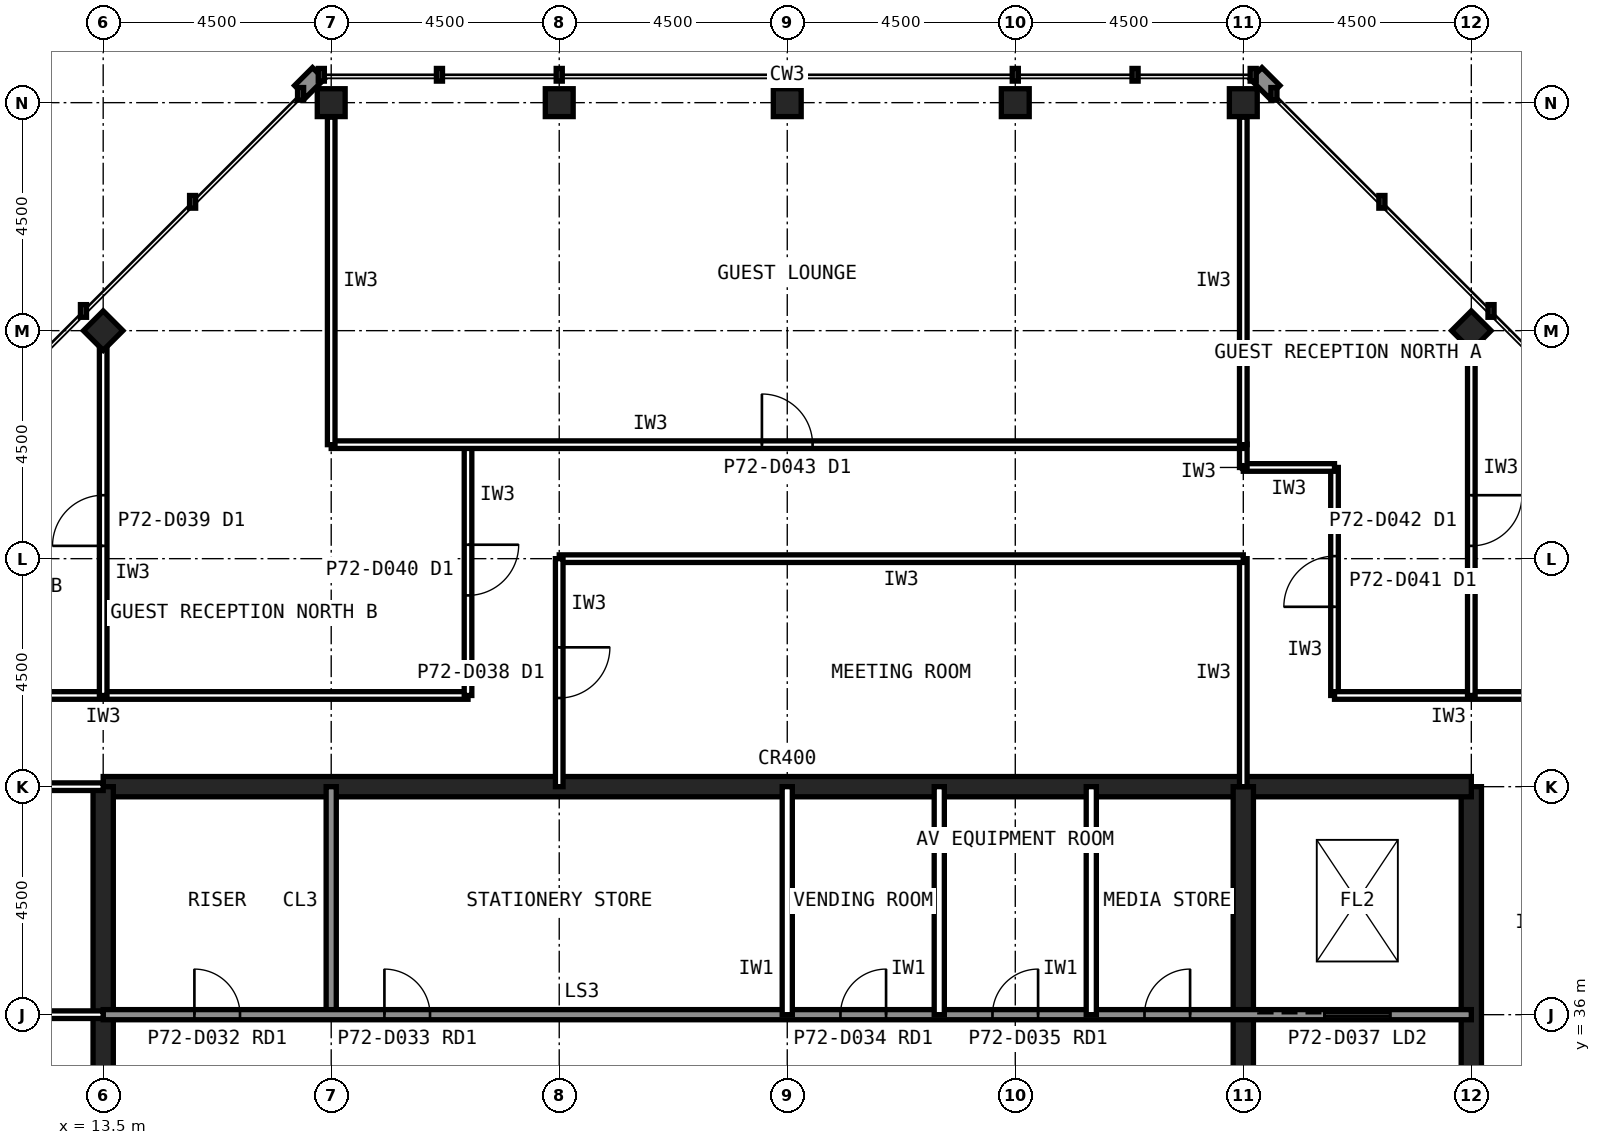
"""IFC4 building model, lengths in metres.
Left out: names, types, materials, properties, quantities, classifications, styles, units other than length and angle.
Written with IfcOpenShell. Run it as: python <this file> out.ifc"""

import sys

from ifc_helpers import new_model, si_unit, direction, frame, frame_2d, origin, origin_2d, place, context, subcontext, project, spatial, rectangle, hollow_rectangle, extrude, element, fill, save


model = new_model("IFC4")
c1 = context("Model", 3, precision=1e-05, world=origin(), true_north=direction((0.0, 1.0)))
c2 = subcontext(c1, "Body", "Model", "MODEL_VIEW")
j1 = project(units=[si_unit("LENGTHUNIT", "METRE"), si_unit("PLANEANGLEUNIT", "RADIAN")], contexts=[c1])
p1 = place(None, origin())
s1 = spatial("IfcSite", under=j1, at=p1, CompositionType="ELEMENT")
p2 = place(p1, origin())
s2 = spatial("IfcBuilding", under=s1, at=p2, CompositionType="ELEMENT")
p3 = place(p2, frame((0.0, 0.0, 302.6)))
s3 = spatial("IfcBuildingStorey", under=s2, at=p3, CompositionType="ELEMENT", Elevation=302.6)
for number, where, z_axis, x_axis in (
    (1, (36.0, 54.0, 0.0), (0.0, 0.0, 1.0), (1.0, 0.0, 0.0)),
    (2, (31.5, 54.0, 0.0), (0.0, 0.0, 1.0), (1.0, 0.0, 0.0)),
    (3, (27.0, 54.0, 0.0), (0.0, 0.0, 1.0), (1.0, 0.0, 0.0)),
    (4, (22.5, 54.0, 0.0), (0.0, 0.0, 1.0), (1.0, 0.0, 0.0)),
    (5, (18.0, 54.0, 0.0), (0.0, 0.0, 1.0), (1.0, 0.0, 0.0)),
    (6, (40.5, 49.5, 0.0), (0.0, 0.0, 1.0), (0.707, 0.707, 0.0)),
    (7, (13.5, 49.5, 0.0), (0.0, 0.0, 1.0), (0.707, 0.707, 0.0)),
):
    element("IfcColumn", number, at=place(p3, frame(where, z_axis=z_axis, x_axis=x_axis)), inside=s3, PredefinedType="COLUMN", context=c2, shape_type="SweptSolid", body=[
        extrude(hollow_rectangle(XDim=0.55, YDim=0.55, WallThickness=0.025, at=origin_2d()), origin(), (0.0, 0.0, 1.0), 4.0),
    ])
p4 = place(p3, frame((40.5, 13.5, 0.0), z_axis=(0.0, 0.0, 1.0), x_axis=(0.0, 1.0, 0.0)))
e8 = element("IfcWall", 8, at=p4, inside=s3, PredefinedType="SHEAR", context=c2, shape_type="SweptSolid", body=[
    extrude(rectangle(XDim=27.0, YDim=0.4, at=frame_2d((13.5, 0.0))), origin(), (0.0, 0.0, 1.0), 4.0),
])
p5 = place(p4, frame((5.85, 0.0, 0.0)))
e9 = element("IfcOpeningElement", 9, at=p5, cuts=e8, PredefinedType="OPENING", context=c2, shape_type="SweptSolid", body=[
    extrude(rectangle(XDim=1.8, YDim=2.1, at=frame_2d((0.9, 1.05))), frame((0.0, 0.21, 0.0), z_axis=(0.0, -1.0, 0.0), x_axis=(1.0, 0.0, 0.0)), (0.0, 0.0, 1.0), 0.42),
])
p6 = place(p4, frame((19.65, 0.0, 0.0)))
e10 = element("IfcOpeningElement", 10, at=p6, cuts=e8, PredefinedType="OPENING", context=c2, shape_type="SweptSolid", body=[
    extrude(rectangle(XDim=1.2, YDim=2.1, at=frame_2d((0.6, 1.05))), frame((0.0, 0.21, 0.0), z_axis=(0.0, -1.0, 0.0), x_axis=(1.0, 0.0, 0.0)), (0.0, 0.0, 1.0), 0.42),
])
p7 = place(p3, frame((40.5, 40.5, 0.0), z_axis=(0.0, 0.0, 1.0), x_axis=(-1.0, 0.0, 0.0)))
e11 = element("IfcWall", 11, at=p7, inside=s3, PredefinedType="SHEAR", context=c2, shape_type="SweptSolid", body=[
    extrude(rectangle(XDim=27.0, YDim=0.4, at=frame_2d((13.5, 0.0))), origin(), (0.0, 0.0, 1.0), 4.0),
])
p8 = place(p3, frame((13.5, 40.5, 0.0), z_axis=(0.0, 0.0, 1.0), x_axis=(0.0, -1.0, 0.0)))
e12 = element("IfcWall", 12, at=p8, inside=s3, PredefinedType="SHEAR", context=c2, shape_type="SweptSolid", body=[
    extrude(rectangle(XDim=27.0, YDim=0.4, at=frame_2d((13.5, 0.0))), origin(), (0.0, 0.0, 1.0), 4.0),
])
p9 = place(p8, frame((19.65, 0.0, 0.0)))
e13 = element("IfcOpeningElement", 13, at=p9, cuts=e12, PredefinedType="OPENING", context=c2, shape_type="SweptSolid", body=[
    extrude(rectangle(XDim=1.2, YDim=2.1, at=frame_2d((0.6, 1.05))), frame((0.0, 0.21, 0.0), z_axis=(0.0, -1.0, 0.0), x_axis=(1.0, 0.0, 0.0)), (0.0, 0.0, 1.0), 0.42),
])
p10 = place(p8, frame((5.85, 0.0, 0.0)))
e14 = element("IfcOpeningElement", 14, at=p10, cuts=e12, PredefinedType="OPENING", context=c2, shape_type="SweptSolid", body=[
    extrude(rectangle(XDim=1.8, YDim=2.1, at=frame_2d((0.9, 1.05))), frame((0.0, 0.21, 0.0), z_axis=(0.0, -1.0, 0.0), x_axis=(1.0, 0.0, 0.0)), (0.0, 0.0, 1.0), 0.42),
])
p11 = place(p3, frame((18.0, 36.0, 0.0), z_axis=(0.0, 0.0, 1.0), x_axis=(0.0, 1.0, 0.0)))
e15 = element("IfcWall", 15, at=p11, inside=s3, PredefinedType="SOLIDWALL", context=c2, shape_type="SweptSolid", body=[
    extrude(rectangle(XDim=4.5, YDim=0.2, at=frame_2d((2.25, 0.0))), origin(), (0.0, 0.0, 1.0), 3.84),
])
p12 = place(p3, frame((36.0, 22.5, 0.0), z_axis=(0.0, 0.0, 1.0), x_axis=(0.0, 1.0, 0.0)))
e16 = element("IfcWall", 16, at=p12, inside=s3, PredefinedType="SHEAR", context=c2, shape_type="SweptSolid", body=[
    extrude(rectangle(XDim=18.0, YDim=0.4, at=frame_2d((9.0, 0.0))), origin(), (0.0, 0.0, 1.0), 4.0),
])
p13 = place(p3, frame((13.5, 36.0, 0.0), z_axis=(0.0, 0.0, 1.0), x_axis=(1.0, 0.0, 0.0)))
e17 = element("IfcWall", 17, at=p13, inside=s3, PredefinedType="SOLIDWALL", context=c2, shape_type="SweptSolid", body=[
    extrude(rectangle(XDim=27.0, YDim=0.2, at=frame_2d((13.5, 0.0))), origin(), (0.0, 0.0, 1.0), 3.84),
])
p14 = place(p13, frame((1.8, 0.0, 0.0)))
e18 = element("IfcOpeningElement", 18, at=p14, cuts=e17, PredefinedType="OPENING", context=c2, shape_type="SweptSolid", body=[
    extrude(rectangle(XDim=0.9, YDim=2.1, at=frame_2d((0.45, 1.05))), frame((0.0, 0.11, 0.0), z_axis=(0.0, -1.0, 0.0), x_axis=(1.0, 0.0, 0.0)), (0.0, 0.0, 1.0), 0.22),
])
p15 = place(p13, frame((5.55, 0.0, 0.0)))
e19 = element("IfcOpeningElement", 19, at=p15, cuts=e17, PredefinedType="OPENING", context=c2, shape_type="SweptSolid", body=[
    extrude(rectangle(XDim=0.9, YDim=2.1, at=frame_2d((0.45, 1.05))), frame((0.0, 0.11, 0.0), z_axis=(0.0, -1.0, 0.0), x_axis=(1.0, 0.0, 0.0)), (0.0, 0.0, 1.0), 0.22),
])
p16 = place(p13, frame((14.55, 0.0, 0.0)))
e20 = element("IfcOpeningElement", 20, at=p16, cuts=e17, PredefinedType="OPENING", context=c2, shape_type="SweptSolid", body=[
    extrude(rectangle(XDim=0.9, YDim=2.1, at=frame_2d((0.45, 1.05))), frame((0.0, 0.11, 0.0), z_axis=(0.0, -1.0, 0.0), x_axis=(1.0, 0.0, 0.0)), (0.0, 0.0, 1.0), 0.22),
])
p17 = place(p13, frame((17.55, 0.0, 0.0)))
e21 = element("IfcOpeningElement", 21, at=p17, cuts=e17, PredefinedType="OPENING", context=c2, shape_type="SweptSolid", body=[
    extrude(rectangle(XDim=0.9, YDim=2.1, at=frame_2d((0.45, 1.05))), frame((0.0, 0.11, 0.0), z_axis=(0.0, -1.0, 0.0), x_axis=(1.0, 0.0, 0.0)), (0.0, 0.0, 1.0), 0.22),
])
p18 = place(p13, frame((20.55, 0.0, 0.0)))
e22 = element("IfcOpeningElement", 22, at=p18, cuts=e17, PredefinedType="OPENING", context=c2, shape_type="SweptSolid", body=[
    extrude(rectangle(XDim=0.9, YDim=2.1, at=frame_2d((0.45, 1.05))), frame((0.0, 0.11, 0.0), z_axis=(0.0, -1.0, 0.0), x_axis=(1.0, 0.0, 0.0)), (0.0, 0.0, 1.0), 0.22),
])
p19 = place(p13, frame((24.1, 0.0, 0.0)))
e23 = element("IfcOpeningElement", 23, at=p19, cuts=e17, PredefinedType="OPENING", context=c2, shape_type="SweptSolid", body=[
    extrude(rectangle(XDim=1.3, YDim=2.2, at=frame_2d((0.65, 1.1))), frame((0.0, 0.11, 0.0), z_axis=(0.0, -1.0, 0.0), x_axis=(1.0, 0.0, 0.0)), (0.0, 0.0, 1.0), 0.22),
])
for number, where, z_axis, x_axis in (
    (24, (27.0, 36.0, 0.0), (0.0, 0.0, 1.0), (0.0, 1.0, 0.0)),
    (25, (30.0, 36.0, 0.0), (0.0, 0.0, 1.0), (0.0, 1.0, 0.0)),
    (26, (33.0, 36.0, 0.0), (0.0, 0.0, 1.0), (0.0, 1.0, 0.0)),
):
    element("IfcWall", number, at=place(p3, frame(where, z_axis=z_axis, x_axis=x_axis)), inside=s3, PredefinedType="PARTITIONING", context=c2, shape_type="SweptSolid", body=[
        extrude(rectangle(XDim=4.5, YDim=0.2, at=frame_2d((2.25, 0.0))), origin(), (0.0, 0.0, 1.0), 3.84),
    ])
p20 = place(p3, frame((37.8, 42.3, 0.0), z_axis=(0.0, 0.0, 1.0), x_axis=(0.0, 1.0, 0.0)))
e27 = element("IfcWall", 27, at=p20, inside=s3, PredefinedType="PARTITIONING", context=c2, shape_type="SweptSolid", body=[
    extrude(rectangle(XDim=4.5, YDim=0.15, at=frame_2d((2.25, 0.0))), origin(), (0.0, 0.0, 1.0), 3.84),
])
p21 = place(p20, frame((1.75, 0.0, 0.0)))
e28 = element("IfcOpeningElement", 28, at=p21, cuts=e27, PredefinedType="OPENING", context=c2, shape_type="SweptSolid", body=[
    extrude(rectangle(XDim=1.0, YDim=2.1, at=frame_2d((0.5, 1.05))), frame((0.0, 0.085, 0.0), z_axis=(0.0, -1.0, 0.0), x_axis=(1.0, 0.0, 0.0)), (0.0, 0.0, 1.0), 0.17),
])
p22 = place(p3, frame((42.3, 42.3, 0.0), z_axis=(0.0, 0.0, 1.0), x_axis=(-1.0, 0.0, 0.0)))
e29 = element("IfcWall", 29, at=p22, inside=s3, PredefinedType="PARTITIONING", context=c2, shape_type="SweptSolid", body=[
    extrude(rectangle(XDim=4.5, YDim=0.15, at=frame_2d((2.25, 0.0))), origin(), (0.0, 0.0, 1.0), 3.84),
])
p23 = place(p3, frame((37.8, 46.8, 0.0), z_axis=(0.0, 0.0, 1.0), x_axis=(-1.0, 0.0, 0.0)))
e30 = element("IfcWall", 30, at=p23, inside=s3, PredefinedType="PARTITIONING", context=c2, shape_type="SweptSolid", body=[
    extrude(rectangle(XDim=1.8, YDim=0.15, at=frame_2d((0.9, 0.0))), origin(), (0.0, 0.0, 1.0), 3.84),
])
p24 = place(p3, frame((36.0, 46.8, 0.0), z_axis=(0.0, 0.0, 1.0), x_axis=(0.0, 1.0, 0.0)))
e31 = element("IfcWall", 31, at=p24, inside=s3, PredefinedType="PARTITIONING", context=c2, shape_type="SweptSolid", body=[
    extrude(rectangle(XDim=0.46, YDim=0.15, at=frame_2d((0.23, 0.0))), origin(), (0.0, 0.0, 1.0), 2.989),
])
p25 = place(p3, frame((20.7, 42.3, 0.0), z_axis=(0.0, 0.0, 1.0), x_axis=(-1.0, 0.0, 0.0)))
e32 = element("IfcWall", 32, at=p25, inside=s3, PredefinedType="PARTITIONING", context=c2, shape_type="SweptSolid", body=[
    extrude(rectangle(XDim=14.4, YDim=0.15, at=frame_2d((7.2, 0.0))), origin(), (0.0, 0.0, 1.0), 3.84),
])
p26 = place(p3, frame((20.7, 47.25, 0.0), z_axis=(0.0, 0.0, 1.0), x_axis=(0.0, -1.0, 0.0)))
e33 = element("IfcWall", 33, at=p26, inside=s3, PredefinedType="PARTITIONING", context=c2, shape_type="SweptSolid", body=[
    extrude(rectangle(XDim=4.95, YDim=0.15, at=frame_2d((2.475, 0.0))), origin(), (0.0, 0.0, 1.0), 3.84),
])
p27 = place(p26, frame((1.975, 0.0, 0.0)))
e34 = element("IfcOpeningElement", 34, at=p27, cuts=e33, PredefinedType="OPENING", context=c2, shape_type="SweptSolid", body=[
    extrude(rectangle(XDim=1.0, YDim=2.1, at=frame_2d((0.5, 1.05))), frame((0.0, 0.085, 0.0), z_axis=(0.0, -1.0, 0.0), x_axis=(1.0, 0.0, 0.0)), (0.0, 0.0, 1.0), 0.17),
])
p28 = place(p3, frame((18.0, 47.25, 0.0), z_axis=(0.0, 0.0, 1.0), x_axis=(1.0, 0.0, 0.0)))
e35 = element("IfcWall", 35, at=p28, inside=s3, PredefinedType="PARTITIONING", context=c2, shape_type="SweptSolid", body=[
    extrude(rectangle(XDim=18.0, YDim=0.15, at=frame_2d((9.0, 0.0))), origin(), (0.0, 0.0, 1.0), 3.84),
])
p29 = place(p28, frame((8.5, 0.0, 0.0)))
e36 = element("IfcOpeningElement", 36, at=p29, cuts=e35, PredefinedType="OPENING", context=c2, shape_type="SweptSolid", body=[
    extrude(rectangle(XDim=1.0, YDim=2.1, at=frame_2d((0.5, 1.05))), frame((0.0, 0.085, 0.0), z_axis=(0.0, -1.0, 0.0), x_axis=(1.0, 0.0, 0.0)), (0.0, 0.0, 1.0), 0.17),
])
for number, where, z_axis, x_axis in (
    (37, (36.0, 47.25, 0.0), (0.0, 0.0, 1.0), (0.0, 1.0, 0.0)),
    (38, (18.0, 53.715, 0.0), (0.0, 0.0, 1.0), (0.0, -1.0, 0.0)),
):
    element("IfcWall", number, at=place(p3, frame(where, z_axis=z_axis, x_axis=x_axis)), inside=s3, PredefinedType="PARTITIONING", context=c2, shape_type="SweptSolid", body=[
        extrude(rectangle(XDim=6.465, YDim=0.15, at=frame_2d((3.232, 0.0))), origin(), (0.0, 0.0, 1.0), 2.989),
    ])
p30 = place(p3, frame((36.0, 40.5, 0.0), z_axis=(0.0, 0.0, 1.0), x_axis=(0.0, 1.0, 0.0)))
e39 = element("IfcWall", 39, at=p30, inside=s3, PredefinedType="PARTITIONING", context=c2, shape_type="SweptSolid", body=[
    extrude(rectangle(XDim=4.5, YDim=0.15, at=frame_2d((2.25, 0.0))), origin(), (0.0, 0.0, 1.0), 2.989),
])
p31 = place(p3, frame((36.0, 45.0, 0.0), z_axis=(0.0, 0.0, 1.0), x_axis=(-1.0, 0.0, 0.0)))
e40 = element("IfcWall", 40, at=p31, inside=s3, PredefinedType="PARTITIONING", context=c2, shape_type="SweptSolid", body=[
    extrude(rectangle(XDim=13.5, YDim=0.15, at=frame_2d((6.75, 0.0))), origin(), (0.0, 0.0, 1.0), 3.84),
])
p32 = place(p3, frame((22.5, 45.0, 0.0), z_axis=(0.0, 0.0, 1.0), x_axis=(0.0, -1.0, 0.0)))
e41 = element("IfcWall", 41, at=p32, inside=s3, PredefinedType="PARTITIONING", context=c2, shape_type="SweptSolid", body=[
    extrude(rectangle(XDim=4.5, YDim=0.15, at=frame_2d((2.25, 0.0))), origin(), (0.0, 0.0, 1.0), 2.989),
])
p33 = place(p32, frame((1.75, 0.0, 0.0)))
e42 = element("IfcOpeningElement", 42, at=p33, cuts=e41, PredefinedType="OPENING", context=c2, shape_type="SweptSolid", body=[
    extrude(rectangle(XDim=1.0, YDim=2.1, at=frame_2d((0.5, 1.05))), frame((0.0, 0.085, 0.0), z_axis=(0.0, -1.0, 0.0), x_axis=(1.0, 0.0, 0.0)), (0.0, 0.0, 1.0), 0.17),
])
p34 = place(p3, frame((8.1, 36.0, 0.0), z_axis=(0.0, 0.0, 1.0), x_axis=(1.0, 0.0, 0.0)))
e43 = element("IfcWall", 43, at=p34, inside=s3, PredefinedType="PARTITIONING", context=c2, shape_type="SweptSolid", body=[
    extrude(rectangle(XDim=5.4, YDim=0.15, at=frame_2d((2.7, 0.0))), origin(), (0.0, 0.0, 1.0), 2.989),
])
p35 = place(p34, frame((2.2, 0.0, 0.0)))
e44 = element("IfcOpeningElement", 44, at=p35, cuts=e43, PredefinedType="OPENING", context=c2, shape_type="SweptSolid", body=[
    extrude(rectangle(XDim=1.0, YDim=2.1, at=frame_2d((0.5, 1.05))), frame((0.0, 0.085, 0.0), z_axis=(0.0, -1.0, 0.0), x_axis=(1.0, 0.0, 0.0)), (0.0, 0.0, 1.0), 0.17),
])
p36 = place(p3, frame((13.5, 40.5, 0.0), z_axis=(0.0, 0.0, 1.0), x_axis=(-1.0, 0.0, 0.0)))
e45 = element("IfcWall", 45, at=p36, inside=s3, PredefinedType="PARTITIONING", context=c2, shape_type="SweptSolid", body=[
    extrude(rectangle(XDim=5.4, YDim=0.15, at=frame_2d((2.7, 0.0))), origin(), (0.0, 0.0, 1.0), 2.989),
])
p37 = place(p3, frame((40.5, 49.205, 0.0), z_axis=(0.0, 0.0, 1.0), x_axis=(0.0, -1.0, 0.0)))
e46 = element("IfcWall", 46, at=p37, inside=s3, PredefinedType="PARTITIONING", context=c2, shape_type="SweptSolid", body=[
    extrude(rectangle(XDim=6.905, YDim=0.15, at=frame_2d((3.453, 0.0))), origin(), (0.0, 0.0, 1.0), 2.989),
])
p38 = place(p37, frame((2.952, 0.0, 0.0)))
e47 = element("IfcOpeningElement", 47, at=p38, cuts=e46, PredefinedType="OPENING", context=c2, shape_type="SweptSolid", body=[
    extrude(rectangle(XDim=1.0, YDim=2.1, at=frame_2d((0.5, 1.05))), frame((0.0, 0.085, 0.0), z_axis=(0.0, -1.0, 0.0), x_axis=(1.0, 0.0, 0.0)), (0.0, 0.0, 1.0), 0.17),
])
p39 = place(p3, frame((13.5, 42.3, 0.0), z_axis=(0.0, 0.0, 1.0), x_axis=(0.0, 1.0, 0.0)))
e48 = element("IfcWall", 48, at=p39, inside=s3, PredefinedType="PARTITIONING", context=c2, shape_type="SweptSolid", body=[
    extrude(rectangle(XDim=6.905, YDim=0.15, at=frame_2d((3.453, 0.0))), origin(), (0.0, 0.0, 1.0), 2.989),
])
p40 = place(p39, frame((2.952, 0.0, 0.0)))
e49 = element("IfcOpeningElement", 49, at=p40, cuts=e48, PredefinedType="OPENING", context=c2, shape_type="SweptSolid", body=[
    extrude(rectangle(XDim=1.0, YDim=2.1, at=frame_2d((0.5, 1.05))), frame((0.0, 0.085, 0.0), z_axis=(0.0, -1.0, 0.0), x_axis=(1.0, 0.0, 0.0)), (0.0, 0.0, 1.0), 0.17),
])
p41 = place(p14, origin())
e50 = element("IfcDoor", 50, at=p41, inside=s3, OperationType="SINGLE_SWING_LEFT", PredefinedType="DOOR", context=c2, shape_type="SweptSolid", body=[
    extrude(rectangle(XDim=0.9, YDim=2.1, at=frame_2d((0.45, 1.05))), frame((0.0, 0.025, 0.0), z_axis=(0.0, -1.0, 0.0), x_axis=(1.0, 0.0, 0.0)), (0.0, 0.0, 1.0), 0.05),
])
fill(e18, e50)
p42 = place(p15, origin())
e51 = element("IfcDoor", 51, at=p42, inside=s3, OperationType="SINGLE_SWING_LEFT", PredefinedType="DOOR", context=c2, shape_type="SweptSolid", body=[
    extrude(rectangle(XDim=0.9, YDim=2.1, at=frame_2d((0.45, 1.05))), frame((0.0, 0.025, 0.0), z_axis=(0.0, -1.0, 0.0), x_axis=(1.0, 0.0, 0.0)), (0.0, 0.0, 1.0), 0.05),
])
fill(e19, e51)
p43 = place(p16, origin())
e52 = element("IfcDoor", 52, at=p43, inside=s3, OperationType="SINGLE_SWING_RIGHT", PredefinedType="DOOR", context=c2, shape_type="SweptSolid", body=[
    extrude(rectangle(XDim=0.9, YDim=2.1, at=frame_2d((0.45, 1.05))), frame((0.0, 0.025, 0.0), z_axis=(0.0, -1.0, 0.0), x_axis=(1.0, 0.0, 0.0)), (0.0, 0.0, 1.0), 0.05),
])
fill(e20, e52)
p44 = place(p17, origin())
e53 = element("IfcDoor", 53, at=p44, inside=s3, OperationType="SINGLE_SWING_RIGHT", PredefinedType="DOOR", context=c2, shape_type="SweptSolid", body=[
    extrude(rectangle(XDim=0.9, YDim=2.1, at=frame_2d((0.45, 1.05))), frame((0.0, 0.025, 0.0), z_axis=(0.0, -1.0, 0.0), x_axis=(1.0, 0.0, 0.0)), (0.0, 0.0, 1.0), 0.05),
])
fill(e21, e53)
p45 = place(p18, origin())
e54 = element("IfcDoor", 54, at=p45, inside=s3, OperationType="SINGLE_SWING_RIGHT", PredefinedType="DOOR", context=c2, shape_type="SweptSolid", body=[
    extrude(rectangle(XDim=0.9, YDim=2.1, at=frame_2d((0.45, 1.05))), frame((0.0, 0.025, 0.0), z_axis=(0.0, -1.0, 0.0), x_axis=(1.0, 0.0, 0.0)), (0.0, 0.0, 1.0), 0.05),
])
fill(e22, e54)
p46 = place(p19, origin())
e55 = element("IfcDoor", 55, at=p46, inside=s3, OperationType="SLIDING_TO_LEFT", PredefinedType="DOOR", context=c2, shape_type="SweptSolid", body=[
    extrude(rectangle(XDim=1.3, YDim=2.2, at=frame_2d((0.65, 1.1))), frame((0.0, 0.025, 0.0), z_axis=(0.0, -1.0, 0.0), x_axis=(1.0, 0.0, 0.0)), (0.0, 0.0, 1.0), 0.05),
])
fill(e23, e55)
p47 = place(p21, origin())
e56 = element("IfcDoor", 56, at=p47, inside=s3, OperationType="SINGLE_SWING_LEFT", PredefinedType="DOOR", context=c2, shape_type="SweptSolid", body=[
    extrude(rectangle(XDim=1.0, YDim=2.1, at=frame_2d((0.5, 1.05))), frame((0.0, 0.025, 0.0), z_axis=(0.0, -1.0, 0.0), x_axis=(1.0, 0.0, 0.0)), (0.0, 0.0, 1.0), 0.05),
])
fill(e28, e56)
p48 = place(p27, origin())
e57 = element("IfcDoor", 57, at=p48, inside=s3, OperationType="SINGLE_SWING_LEFT", PredefinedType="DOOR", context=c2, shape_type="SweptSolid", body=[
    extrude(rectangle(XDim=1.0, YDim=2.1, at=frame_2d((0.5, 1.05))), frame((0.0, 0.025, 0.0), z_axis=(0.0, -1.0, 0.0), x_axis=(1.0, 0.0, 0.0)), (0.0, 0.0, 1.0), 0.05),
])
fill(e34, e57)
p49 = place(p29, origin())
e58 = element("IfcDoor", 58, at=p49, inside=s3, OperationType="SINGLE_SWING_LEFT", PredefinedType="DOOR", context=c2, shape_type="SweptSolid", body=[
    extrude(rectangle(XDim=1.0, YDim=2.1, at=frame_2d((0.5, 1.05))), frame((0.0, 0.025, 0.0), z_axis=(0.0, -1.0, 0.0), x_axis=(1.0, 0.0, 0.0)), (0.0, 0.0, 1.0), 0.05),
])
fill(e36, e58)
p50 = place(p33, origin())
e59 = element("IfcDoor", 59, at=p50, inside=s3, OperationType="SINGLE_SWING_LEFT", PredefinedType="DOOR", context=c2, shape_type="SweptSolid", body=[
    extrude(rectangle(XDim=1.0, YDim=2.1, at=frame_2d((0.5, 1.05))), frame((0.0, 0.025, 0.0), z_axis=(0.0, -1.0, 0.0), x_axis=(1.0, 0.0, 0.0)), (0.0, 0.0, 1.0), 0.05),
])
fill(e42, e59)
p51 = place(p38, origin())
e60 = element("IfcDoor", 60, at=p51, inside=s3, OperationType="SINGLE_SWING_LEFT", PredefinedType="DOOR", context=c2, shape_type="SweptSolid", body=[
    extrude(rectangle(XDim=1.0, YDim=2.1, at=frame_2d((0.5, 1.05))), frame((0.0, 0.025, 0.0), z_axis=(0.0, -1.0, 0.0), x_axis=(1.0, 0.0, 0.0)), (0.0, 0.0, 1.0), 0.05),
])
fill(e47, e60)
p52 = place(p40, origin())
e61 = element("IfcDoor", 61, at=p52, inside=s3, OperationType="SINGLE_SWING_LEFT", PredefinedType="DOOR", context=c2, shape_type="SweptSolid", body=[
    extrude(rectangle(XDim=1.0, YDim=2.1, at=frame_2d((0.5, 1.05))), frame((0.0, 0.025, 0.0), z_axis=(0.0, -1.0, 0.0), x_axis=(1.0, 0.0, 0.0)), (0.0, 0.0, 1.0), 0.05),
])
fill(e49, e61)
save(model, sys.argv[1])
